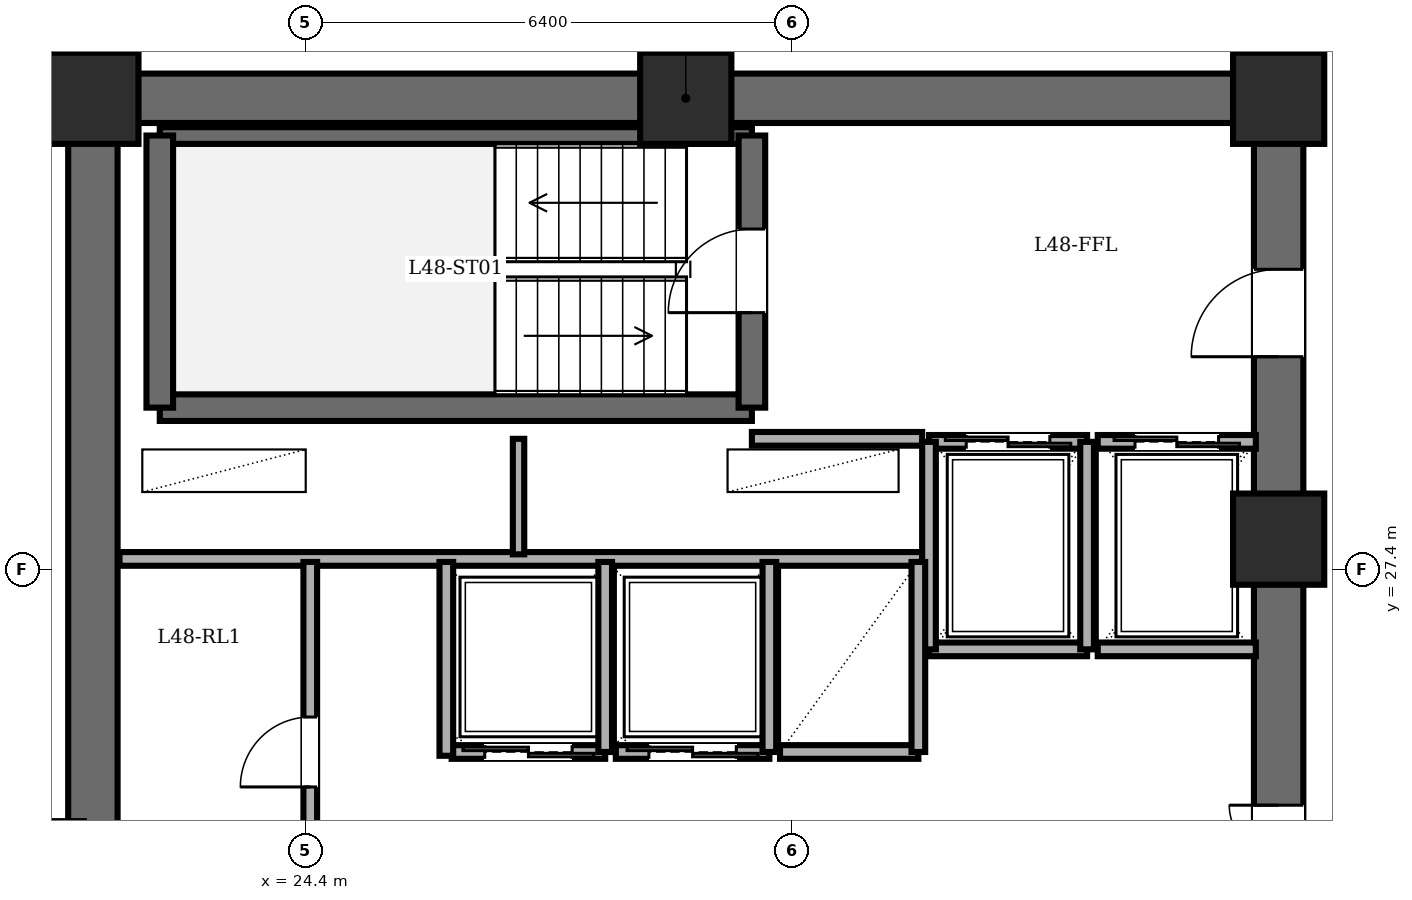
"""IFC4 building model, lengths in metres.
Left out: names, types, materials, properties, quantities, classifications, styles, units other than length and angle.
Written with IfcOpenShell. Run it as: python <this file> out.ifc"""

import sys

from ifc_helpers import new_model, si_unit, direction, frame, frame_2d, origin, origin_2d, place, context, subcontext, project, spatial, rectangle, extrude, element, fill, save


model = new_model("IFC4")
c1 = context("Model", 3, precision=1e-05, world=origin(), true_north=direction((0.0, 1.0)))
c2 = subcontext(c1, "Body", "Model", "MODEL_VIEW")
j1 = project(units=[si_unit("LENGTHUNIT", "METRE"), si_unit("PLANEANGLEUNIT", "RADIAN")], contexts=[c1])
p1 = place(None, origin())
s1 = spatial("IfcSite", under=j1, at=p1, CompositionType="ELEMENT")
p2 = place(p1, origin())
s2 = spatial("IfcBuilding", under=s1, at=p2, CompositionType="ELEMENT")
p3 = place(p2, frame((0.0, 0.0, 183.4)))
s3 = spatial("IfcBuildingStorey", under=s2, at=p3, CompositionType="ELEMENT", Elevation=183.4)
for number, where, z_axis, x_axis in (
    (1, (37.2, 27.8, 0.0), (0.0, 0.0, 1.0), (1.0, 0.0, 0.0)),
    (2, (37.2, 33.6, 0.0), (0.0, 0.0, 1.0), (1.0, 0.0, 0.0)),
    (3, (29.4, 33.6, 0.0), (0.0, 0.0, 1.0), (1.0, 0.0, 0.0)),
    (4, (21.6, 33.6, 0.0), (0.0, 0.0, 1.0), (1.0, 0.0, 0.0)),
):
    element("IfcColumn", number, at=place(p3, frame(where, z_axis=z_axis, x_axis=x_axis)), inside=s3, PredefinedType="COLUMN", context=c2, shape_type="SweptSolid", body=[
        extrude(rectangle(XDim=1.2, YDim=1.2, at=origin_2d()), origin(), (0.0, 0.0, 1.0), 3.6),
    ])
p4 = place(p3, frame((21.6, 14.4, 0.0), z_axis=(0.0, 0.0, 1.0), x_axis=(0.0, 1.0, 0.0)))
e5 = element("IfcWall", 5, at=p4, inside=s3, PredefinedType="SHEAR", context=c2, shape_type="SweptSolid", body=[
    extrude(rectangle(XDim=19.2, YDim=0.65, at=frame_2d((9.6, 0.0))), origin(), (0.0, 0.0, 1.0), 3.4),
])
p5 = place(p3, frame((21.6, 33.6, 0.0), z_axis=(0.0, 0.0, 1.0), x_axis=(1.0, 0.0, 0.0)))
e6 = element("IfcWall", 6, at=p5, inside=s3, PredefinedType="SHEAR", context=c2, shape_type="SweptSolid", body=[
    extrude(rectangle(XDim=15.6, YDim=0.65, at=frame_2d((7.8, 0.0))), origin(), (0.0, 0.0, 1.0), 3.4),
])
p6 = place(p3, frame((37.2, 14.4, 0.0), z_axis=(0.0, 0.0, 1.0), x_axis=(0.0, 1.0, 0.0)))
e7 = element("IfcWall", 7, at=p6, inside=s3, PredefinedType="SHEAR", context=c2, shape_type="SweptSolid", body=[
    extrude(rectangle(XDim=19.2, YDim=0.65, at=frame_2d((9.6, 0.0))), origin(), (0.0, 0.0, 1.0), 3.4),
])
p7 = place(p6, frame((15.8, 0.0, 0.0)))
e8 = element("IfcOpeningElement", 8, at=p7, cuts=e7, PredefinedType="OPENING", context=c2, shape_type="SweptSolid", body=[
    extrude(rectangle(XDim=1.15, YDim=2.15, at=frame_2d((0.575, 1.075))), frame((0.0, 0.335, 0.0), z_axis=(0.0, -1.0, 0.0), x_axis=(1.0, 0.0, 0.0)), (0.0, 0.0, 1.0), 0.67),
])
p8 = place(p6, frame((3.6, 0.0, 0.0)))
e9 = element("IfcOpeningElement", 9, at=p8, cuts=e7, PredefinedType="OPENING", context=c2, shape_type="SweptSolid", body=[
    extrude(rectangle(XDim=1.1, YDim=2.15, at=frame_2d((0.55, 1.075))), frame((0.0, 0.335, 0.0), z_axis=(0.0, -1.0, 0.0), x_axis=(1.0, 0.0, 0.0)), (0.0, 0.0, 1.0), 0.67),
])
p9 = place(p6, frame((8.6, 0.0, 0.0)))
e10 = element("IfcOpeningElement", 10, at=p9, cuts=e7, PredefinedType="OPENING", context=c2, shape_type="SweptSolid", body=[
    extrude(rectangle(XDim=1.3, YDim=2.2, at=frame_2d((0.65, 1.1))), frame((0.0, 0.335, 0.0), z_axis=(0.0, -1.0, 0.0), x_axis=(1.0, 0.0, 0.0)), (0.0, 0.0, 1.0), 0.67),
])
p10 = place(p3, frame((22.48, 29.53, 0.0), z_axis=(0.0, 0.0, 1.0), x_axis=(1.0, 0.0, 0.0)))
e11 = element("IfcWall", 11, at=p10, inside=s3, PredefinedType="SOLIDWALL", context=c2, shape_type="SweptSolid", body=[
    extrude(rectangle(XDim=7.79, YDim=0.35, at=frame_2d((3.895, 0.0))), origin(), (0.0, 0.0, 1.0), 3.4),
])
p11 = place(p3, frame((22.48, 33.11, 0.0), z_axis=(0.0, 0.0, 1.0), x_axis=(1.0, 0.0, 0.0)))
e12 = element("IfcWall", 12, at=p11, inside=s3, PredefinedType="PARTITIONING", context=c2, shape_type="SweptSolid", body=[
    extrude(rectangle(XDim=7.79, YDim=0.22, at=frame_2d((3.895, 0.0))), origin(), (0.0, 0.0, 1.0), 3.4),
])
p12 = place(p3, frame((22.48, 29.53, 0.0), z_axis=(0.0, 0.0, 1.0), x_axis=(0.0, 1.0, 0.0)))
e13 = element("IfcWall", 13, at=p12, inside=s3, PredefinedType="SOLIDWALL", context=c2, shape_type="SweptSolid", body=[
    extrude(rectangle(XDim=3.58, YDim=0.35, at=frame_2d((1.79, 0.0))), origin(), (0.0, 0.0, 1.0), 3.4),
])
p13 = place(p3, frame((30.27, 29.53, 0.0), z_axis=(0.0, 0.0, 1.0), x_axis=(0.0, 1.0, 0.0)))
e14 = element("IfcWall", 14, at=p13, inside=s3, PredefinedType="SOLIDWALL", context=c2, shape_type="SweptSolid", body=[
    extrude(rectangle(XDim=3.58, YDim=0.35, at=frame_2d((1.79, 0.0))), origin(), (0.0, 0.0, 1.0), 3.4),
])
p14 = place(p13, frame((1.25, 0.0, 0.0)))
e15 = element("IfcOpeningElement", 15, at=p14, cuts=e14, PredefinedType="OPENING", context=c2, shape_type="SweptSolid", body=[
    extrude(rectangle(XDim=1.1, YDim=2.15, at=frame_2d((0.55, 1.075))), frame((0.0, 0.185, 0.0), z_axis=(0.0, -1.0, 0.0), x_axis=(1.0, 0.0, 0.0)), (0.0, 0.0, 1.0), 0.37),
])
p15 = place(p3, frame((30.27, 29.12, 0.0), z_axis=(0.0, 0.0, 1.0), x_axis=(1.0, 0.0, 0.0)))
e16 = element("IfcWall", 16, at=p15, inside=s3, PredefinedType="PARTITIONING", context=c2, shape_type="SweptSolid", body=[
    extrude(rectangle(XDim=2.24, YDim=0.18, at=frame_2d((1.12, 0.0))), origin(), (0.0, 0.0, 1.0), 3.4),
])
p16 = place(p3, frame((21.95, 27.54, 0.0), z_axis=(0.0, 0.0, 1.0), x_axis=(1.0, 0.0, 0.0)))
e17 = element("IfcWall", 17, at=p16, inside=s3, PredefinedType="PARTITIONING", context=c2, shape_type="SweptSolid", body=[
    extrude(rectangle(XDim=10.56, YDim=0.18, at=frame_2d((5.28, 0.0))), origin(), (0.0, 0.0, 1.0), 3.4),
])
p17 = place(p3, frame((27.2, 27.6, 0.0), z_axis=(0.0, 0.0, 1.0), x_axis=(0.0, 1.0, 0.0)))
e18 = element("IfcWall", 18, at=p17, inside=s3, PredefinedType="PARTITIONING", context=c2, shape_type="SweptSolid", body=[
    extrude(rectangle(XDim=1.52, YDim=0.15, at=frame_2d((0.76, 0.0))), origin(), (0.0, 0.0, 1.0), 3.4),
])
p18 = place(p3, frame((32.6, 29.08, 0.0), z_axis=(0.0, 0.0, 1.0), x_axis=(1.0, 0.0, 0.0)))
e19 = element("IfcWall", 19, at=p18, inside=s3, PredefinedType="PARTITIONING", context=c2, shape_type="SweptSolid", body=[
    extrude(rectangle(XDim=2.08, YDim=0.18, at=frame_2d((1.04, 0.0))), origin(), (0.0, 0.0, 1.0), 3.4),
])
p19 = place(p18, frame((0.49, 0.0, 0.0)))
e20 = element("IfcOpeningElement", 20, at=p19, cuts=e19, PredefinedType="OPENING", context=c2, shape_type="SweptSolid", body=[
    extrude(rectangle(XDim=1.1, YDim=2.2, at=frame_2d((0.55, 1.1))), frame((0.0, 0.1, 0.0), z_axis=(0.0, -1.0, 0.0), x_axis=(1.0, 0.0, 0.0)), (0.0, 0.0, 1.0), 0.2),
])
p20 = place(p3, frame((34.68, 26.35, 0.0), z_axis=(0.0, 0.0, 1.0), x_axis=(-1.0, 0.0, 0.0)))
e21 = element("IfcWall", 21, at=p20, inside=s3, PredefinedType="PARTITIONING", context=c2, shape_type="SweptSolid", body=[
    extrude(rectangle(XDim=2.08, YDim=0.18, at=frame_2d((1.04, 0.0))), origin(), (0.0, 0.0, 1.0), 3.4),
])
for number, where, z_axis, x_axis in (
    (22, (34.68, 26.35, 0.0), (0.0, 0.0, 1.0), (0.0, 1.0, 0.0)),
    (23, (32.6, 29.08, 0.0), (0.0, 0.0, 1.0), (0.0, -1.0, 0.0)),
):
    element("IfcWall", number, at=place(p3, frame(where, z_axis=z_axis, x_axis=x_axis)), inside=s3, PredefinedType="PARTITIONING", context=c2, shape_type="SweptSolid", body=[
        extrude(rectangle(XDim=2.73, YDim=0.18, at=frame_2d((1.365, 0.0))), origin(), (0.0, 0.0, 1.0), 3.4),
    ])
p21 = place(p3, frame((34.82, 29.08, 0.0), z_axis=(0.0, 0.0, 1.0), x_axis=(1.0, 0.0, 0.0)))
e24 = element("IfcWall", 24, at=p21, inside=s3, PredefinedType="PARTITIONING", context=c2, shape_type="SweptSolid", body=[
    extrude(rectangle(XDim=2.08, YDim=0.18, at=frame_2d((1.04, 0.0))), origin(), (0.0, 0.0, 1.0), 3.4),
])
p22 = place(p21, frame((0.49, 0.0, 0.0)))
e25 = element("IfcOpeningElement", 25, at=p22, cuts=e24, PredefinedType="OPENING", context=c2, shape_type="SweptSolid", body=[
    extrude(rectangle(XDim=1.1, YDim=2.2, at=frame_2d((0.55, 1.1))), frame((0.0, 0.1, 0.0), z_axis=(0.0, -1.0, 0.0), x_axis=(1.0, 0.0, 0.0)), (0.0, 0.0, 1.0), 0.2),
])
p23 = place(p3, frame((36.9, 26.35, 0.0), z_axis=(0.0, 0.0, 1.0), x_axis=(-1.0, 0.0, 0.0)))
e26 = element("IfcWall", 26, at=p23, inside=s3, PredefinedType="PARTITIONING", context=c2, shape_type="SweptSolid", body=[
    extrude(rectangle(XDim=2.08, YDim=0.18, at=frame_2d((1.04, 0.0))), origin(), (0.0, 0.0, 1.0), 3.4),
])
p24 = place(p3, frame((28.34, 25.0, 0.0), z_axis=(0.0, 0.0, 1.0), x_axis=(-1.0, 0.0, 0.0)))
e27 = element("IfcWall", 27, at=p24, inside=s3, PredefinedType="PARTITIONING", context=c2, shape_type="SweptSolid", body=[
    extrude(rectangle(XDim=2.02, YDim=0.18, at=frame_2d((1.01, 0.0))), origin(), (0.0, 0.0, 1.0), 3.4),
])
p25 = place(p24, frame((0.435, 0.0, 0.0)))
e28 = element("IfcOpeningElement", 28, at=p25, cuts=e27, PredefinedType="OPENING", context=c2, shape_type="SweptSolid", body=[
    extrude(rectangle(XDim=1.15, YDim=2.2, at=frame_2d((0.575, 1.1))), frame((0.0, 0.1, 0.0), z_axis=(0.0, -1.0, 0.0), x_axis=(1.0, 0.0, 0.0)), (0.0, 0.0, 1.0), 0.2),
])
p26 = place(p3, frame((28.34, 25.0, 0.0), z_axis=(0.0, 0.0, 1.0), x_axis=(0.0, 1.0, 0.0)))
e29 = element("IfcWall", 29, at=p26, inside=s3, PredefinedType="PARTITIONING", context=c2, shape_type="SweptSolid", body=[
    extrude(rectangle(XDim=2.5, YDim=0.18, at=frame_2d((1.25, 0.0))), origin(), (0.0, 0.0, 1.0), 3.4),
])
p27 = place(p3, frame((30.5, 25.0, 0.0), z_axis=(0.0, 0.0, 1.0), x_axis=(-1.0, 0.0, 0.0)))
e30 = element("IfcWall", 30, at=p27, inside=s3, PredefinedType="PARTITIONING", context=c2, shape_type="SweptSolid", body=[
    extrude(rectangle(XDim=2.02, YDim=0.18, at=frame_2d((1.01, 0.0))), origin(), (0.0, 0.0, 1.0), 3.4),
])
p28 = place(p27, frame((0.435, 0.0, 0.0)))
e31 = element("IfcOpeningElement", 31, at=p28, cuts=e30, PredefinedType="OPENING", context=c2, shape_type="SweptSolid", body=[
    extrude(rectangle(XDim=1.15, YDim=2.2, at=frame_2d((0.575, 1.1))), frame((0.0, 0.1, 0.0), z_axis=(0.0, -1.0, 0.0), x_axis=(1.0, 0.0, 0.0)), (0.0, 0.0, 1.0), 0.2),
])
p29 = place(p3, frame((30.5, 25.0, 0.0), z_axis=(0.0, 0.0, 1.0), x_axis=(0.0, 1.0, 0.0)))
e32 = element("IfcWall", 32, at=p29, inside=s3, PredefinedType="PARTITIONING", context=c2, shape_type="SweptSolid", body=[
    extrude(rectangle(XDim=2.5, YDim=0.18, at=frame_2d((1.25, 0.0))), origin(), (0.0, 0.0, 1.0), 3.4),
])
p30 = place(p3, frame((32.46, 25.0, 0.0), z_axis=(0.0, 0.0, 1.0), x_axis=(-1.0, 0.0, 0.0)))
e33 = element("IfcWall", 33, at=p30, inside=s3, PredefinedType="PARTITIONING", context=c2, shape_type="SweptSolid", body=[
    extrude(rectangle(XDim=1.82, YDim=0.18, at=frame_2d((0.91, 0.0))), origin(), (0.0, 0.0, 1.0), 3.4),
])
p31 = place(p3, frame((32.46, 25.0, 0.0), z_axis=(0.0, 0.0, 1.0), x_axis=(0.0, 1.0, 0.0)))
e34 = element("IfcWall", 34, at=p31, inside=s3, PredefinedType="PARTITIONING", context=c2, shape_type="SweptSolid", body=[
    extrude(rectangle(XDim=2.5, YDim=0.18, at=frame_2d((1.25, 0.0))), origin(), (0.0, 0.0, 1.0), 3.4),
])
p32 = place(p3, frame((24.46, 22.5, 0.0), z_axis=(0.0, 0.0, 1.0), x_axis=(0.0, 1.0, 0.0)))
e35 = element("IfcWall", 35, at=p32, inside=s3, PredefinedType="PARTITIONING", context=c2, shape_type="SweptSolid", body=[
    extrude(rectangle(XDim=5.0, YDim=0.18, at=frame_2d((2.5, 0.0))), origin(), (0.0, 0.0, 1.0), 3.4),
])
p33 = place(p32, frame((2.04, 0.0, 0.0)))
e36 = element("IfcOpeningElement", 36, at=p33, cuts=e35, PredefinedType="OPENING", context=c2, shape_type="SweptSolid", body=[
    extrude(rectangle(XDim=0.92, YDim=2.1, at=frame_2d((0.46, 1.05))), frame((0.0, 0.1, 0.0), z_axis=(0.0, -1.0, 0.0), x_axis=(1.0, 0.0, 0.0)), (0.0, 0.0, 1.0), 0.2),
])
p34 = place(p3, frame((26.25, 24.95, 0.0), z_axis=(0.0, 0.0, 1.0), x_axis=(0.0, 1.0, 0.0)))
e37 = element("IfcWall", 37, at=p34, inside=s3, PredefinedType="PARTITIONING", context=c2, shape_type="SweptSolid", body=[
    extrude(rectangle(XDim=2.55, YDim=0.18, at=frame_2d((1.275, 0.0))), origin(), (0.0, 0.0, 1.0), 3.4),
])
p35 = place(p3, frame((13.8, 33.82, 0.0), z_axis=(0.0, 0.0, 1.0), x_axis=(1.0, 0.0, 0.0)))
e38 = element("IfcWall", 38, at=p35, inside=s3, PredefinedType="PARTITIONING", context=c2, shape_type="SweptSolid", body=[
    extrude(rectangle(XDim=7.68, YDim=0.18, at=frame_2d((3.84, 0.0))), origin(), (0.0, 0.0, 1.0), 3.4),
])
p36 = place(p35, frame((3.68, 0.0, 0.0)))
e39 = element("IfcOpeningElement", 39, at=p36, cuts=e38, PredefinedType="OPENING", context=c2, shape_type="SweptSolid", body=[
    extrude(rectangle(XDim=1.0, YDim=2.15, at=frame_2d((0.5, 1.075))), frame((0.0, 0.1, 0.0), z_axis=(0.0, -1.0, 0.0), x_axis=(1.0, 0.0, 0.0)), (0.0, 0.0, 1.0), 0.2),
])
p37 = place(p14, origin())
e40 = element("IfcDoor", 40, at=p37, inside=s3, OperationType="SINGLE_SWING_LEFT", PredefinedType="DOOR", context=c2, shape_type="SweptSolid", body=[
    extrude(rectangle(XDim=1.1, YDim=2.15, at=frame_2d((0.55, 1.075))), frame((0.0, 0.025, 0.0), z_axis=(0.0, -1.0, 0.0), x_axis=(1.0, 0.0, 0.0)), (0.0, 0.0, 1.0), 0.05),
])
fill(e15, e40)
p38 = place(p7, origin())
e41 = element("IfcDoor", 41, at=p38, inside=s3, OperationType="SINGLE_SWING_LEFT", PredefinedType="DOOR", context=c2, shape_type="SweptSolid", body=[
    extrude(rectangle(XDim=1.15, YDim=2.15, at=frame_2d((0.575, 1.075))), frame((0.0, 0.025, 0.0), z_axis=(0.0, -1.0, 0.0), x_axis=(1.0, 0.0, 0.0)), (0.0, 0.0, 1.0), 0.05),
])
fill(e8, e41)
p39 = place(p19, origin())
e42 = element("IfcDoor", 42, at=p39, inside=s3, OperationType="DOUBLE_DOOR_SLIDING", PredefinedType="DOOR", context=c2, shape_type="SweptSolid", body=[
    extrude(rectangle(XDim=1.1, YDim=2.2, at=frame_2d((0.55, 1.1))), frame((0.0, 0.025, 0.0), z_axis=(0.0, -1.0, 0.0), x_axis=(1.0, 0.0, 0.0)), (0.0, 0.0, 1.0), 0.05),
])
fill(e20, e42)
p40 = place(p22, origin())
e43 = element("IfcDoor", 43, at=p40, inside=s3, OperationType="DOUBLE_DOOR_SLIDING", PredefinedType="DOOR", context=c2, shape_type="SweptSolid", body=[
    extrude(rectangle(XDim=1.1, YDim=2.2, at=frame_2d((0.55, 1.1))), frame((0.0, 0.025, 0.0), z_axis=(0.0, -1.0, 0.0), x_axis=(1.0, 0.0, 0.0)), (0.0, 0.0, 1.0), 0.05),
])
fill(e25, e43)
p41 = place(p25, origin())
e44 = element("IfcDoor", 44, at=p41, inside=s3, OperationType="DOUBLE_DOOR_SLIDING", PredefinedType="DOOR", context=c2, shape_type="SweptSolid", body=[
    extrude(rectangle(XDim=1.15, YDim=2.2, at=frame_2d((0.575, 1.1))), frame((0.0, 0.025, 0.0), z_axis=(0.0, -1.0, 0.0), x_axis=(1.0, 0.0, 0.0)), (0.0, 0.0, 1.0), 0.05),
])
fill(e28, e44)
p42 = place(p28, origin())
e45 = element("IfcDoor", 45, at=p42, inside=s3, OperationType="DOUBLE_DOOR_SLIDING", PredefinedType="DOOR", context=c2, shape_type="SweptSolid", body=[
    extrude(rectangle(XDim=1.15, YDim=2.2, at=frame_2d((0.575, 1.1))), frame((0.0, 0.025, 0.0), z_axis=(0.0, -1.0, 0.0), x_axis=(1.0, 0.0, 0.0)), (0.0, 0.0, 1.0), 0.05),
])
fill(e31, e45)
p43 = place(p33, origin())
e46 = element("IfcDoor", 46, at=p43, inside=s3, OperationType="SINGLE_SWING_LEFT", PredefinedType="DOOR", context=c2, shape_type="SweptSolid", body=[
    extrude(rectangle(XDim=0.92, YDim=2.1, at=frame_2d((0.46, 1.05))), frame((0.0, 0.025, 0.0), z_axis=(0.0, -1.0, 0.0), x_axis=(1.0, 0.0, 0.0)), (0.0, 0.0, 1.0), 0.05),
])
fill(e36, e46)
p44 = place(p9, origin())
e47 = element("IfcDoor", 47, at=p44, inside=s3, OperationType="DOUBLE_DOOR_SINGLE_SWING", PredefinedType="DOOR", context=c2, shape_type="SweptSolid", body=[
    extrude(rectangle(XDim=1.3, YDim=2.2, at=frame_2d((0.65, 1.1))), frame((0.0, 0.025, 0.0), z_axis=(0.0, -1.0, 0.0), x_axis=(1.0, 0.0, 0.0)), (0.0, 0.0, 1.0), 0.05),
])
fill(e10, e47)
save(model, sys.argv[1])
